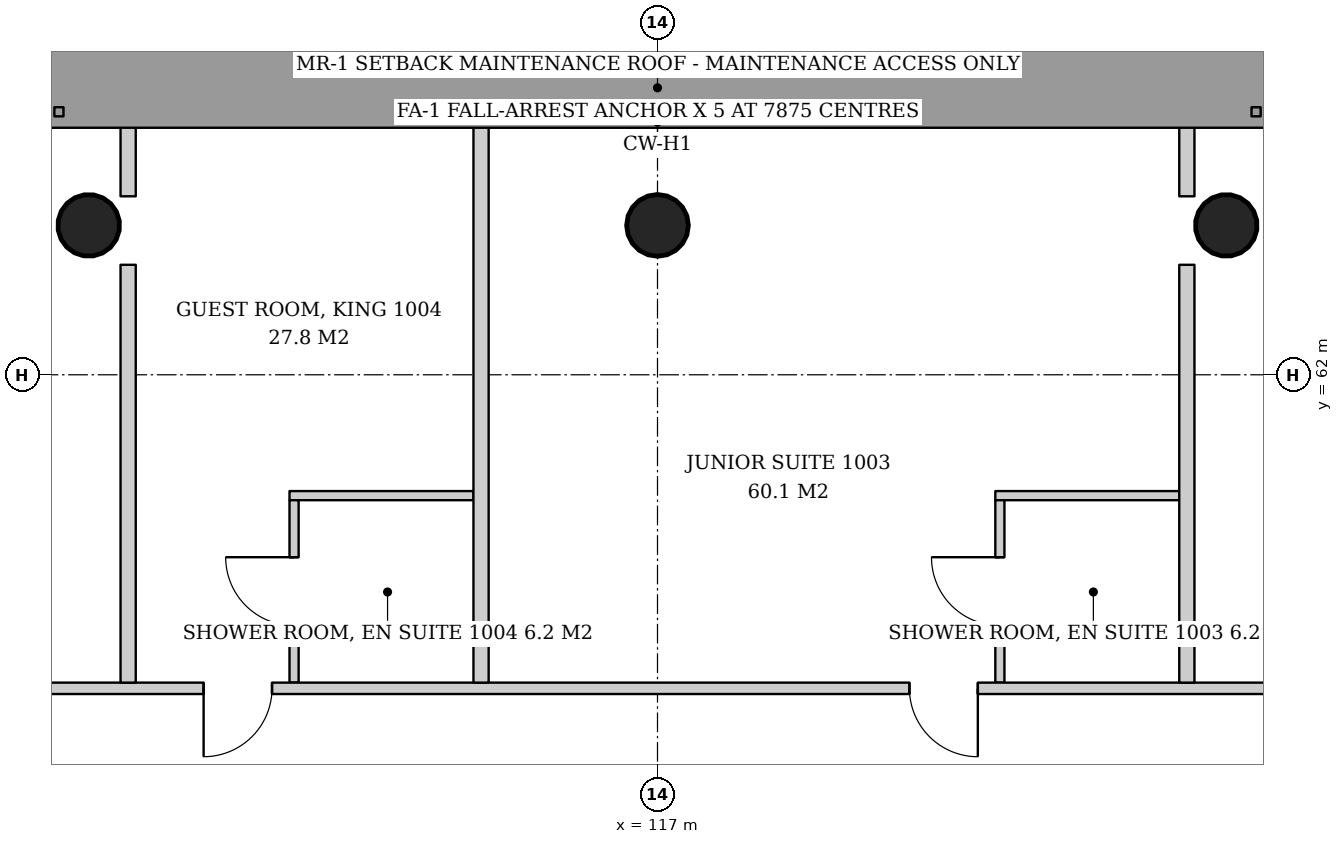
"""IFC4 building model, lengths in metres.
Left out: names, types, materials, properties, quantities, classifications, styles, units other than length and angle.
Written with IfcOpenShell. Run it as: python <this file> out.ifc"""

import sys

from ifc_helpers import new_model, si_unit, direction, frame, frame_2d, origin, origin_2d, place, context, subcontext, project, spatial, rectangle, hollow_circle, extrude, element, fill, save


model = new_model("IFC4")
c1 = context("Model", 3, precision=1e-05, world=origin(), true_north=direction((0.0, 1.0)))
c2 = subcontext(c1, "Body", "Model", "MODEL_VIEW")
j1 = project(units=[si_unit("LENGTHUNIT", "METRE"), si_unit("PLANEANGLEUNIT", "RADIAN")], contexts=[c1])
p1 = place(None, origin())
s1 = spatial("IfcSite", under=j1, at=p1, CompositionType="ELEMENT")
p2 = place(p1, origin())
s2 = spatial("IfcBuilding", under=s1, at=p2, CompositionType="ELEMENT")
p3 = place(p2, frame((0.0, 0.0, 43.8)))
s3 = spatial("IfcBuildingStorey", under=s2, at=p3, CompositionType="ELEMENT", Elevation=43.8)
p4 = place(p3, frame((124.509, 64.017, 0.0), z_axis=(-0.021497706284, -0.043059584825, 0.998841188968), x_axis=(0.894693706707, -0.446680166538, 0.0)))
e1 = element("IfcColumn", 1, at=p4, inside=s3, PredefinedType="COLUMN", context=c2, shape_type="SweptSolid", body=[
    extrude(hollow_circle(Radius=0.406, WallThickness=0.03, at=origin_2d()), origin(), (0.0, 0.0, 1.0), 3.804),
])
p5 = place(p3, frame((117.0, 64.017, 0.0), z_axis=(0.0, -0.043069538298, 0.999072076915), x_axis=(1.0, 0.0, 0.0)))
e2 = element("IfcColumn", 2, at=p5, inside=s3, PredefinedType="COLUMN", context=c2, shape_type="SweptSolid", body=[
    extrude(hollow_circle(Radius=0.406, WallThickness=0.03, at=origin_2d()), origin(), (0.0, 0.0, 1.0), 3.803),
])
p6 = place(p3, frame((109.491, 64.017, 0.0), z_axis=(0.021497706284, -0.043059584825, 0.998841188968), x_axis=(0.894693706707, 0.446680166538, 0.0)))
e3 = element("IfcColumn", 3, at=p6, inside=s3, PredefinedType="COLUMN", context=c2, shape_type="SweptSolid", body=[
    extrude(hollow_circle(Radius=0.406, WallThickness=0.03, at=origin_2d()), origin(), (0.0, 0.0, 1.0), 3.804),
])
p7 = place(p3, frame((123.864, 60.41, 0.0), z_axis=(0.0, 0.0, 1.0), x_axis=(-1.0, 0.0, 0.0)))
e4 = element("IfcWall", 4, at=p7, inside=s3, PredefinedType="PARTITIONING", context=c2, shape_type="SweptSolid", body=[
    extrude(rectangle(XDim=2.42, YDim=0.12, at=frame_2d((1.21, 0.0))), origin(), (0.0, 0.0, 1.0), 2.847),
])
p8 = place(p3, frame((121.504, 57.95, 0.0), z_axis=(0.0, 0.0, 1.0), x_axis=(0.0, 1.0, 0.0)))
e5 = element("IfcWall", 5, at=p8, inside=s3, PredefinedType="PARTITIONING", context=c2, shape_type="SweptSolid", body=[
    extrude(rectangle(XDim=2.4, YDim=0.12, at=frame_2d((1.2, 0.0))), origin(), (0.0, 0.0, 1.0), 2.847),
])
p9 = place(p8, frame((0.75, 0.0, 0.0)))
e6 = element("IfcOpeningElement", 6, at=p9, cuts=e5, PredefinedType="OPENING", context=c2, shape_type="SweptSolid", body=[
    extrude(rectangle(XDim=0.9, YDim=2.1, at=frame_2d((0.45, 1.05))), frame((0.0, 0.07, 0.0), z_axis=(0.0, -1.0, 0.0), x_axis=(1.0, 0.0, 0.0)), (0.0, 0.0, 1.0), 0.14),
])
p10 = place(p3, frame((114.579, 60.41, 0.0), z_axis=(0.0, 0.0, 1.0), x_axis=(-1.0, 0.0, 0.0)))
e7 = element("IfcWall", 7, at=p10, inside=s3, PredefinedType="PARTITIONING", context=c2, shape_type="SweptSolid", body=[
    extrude(rectangle(XDim=2.42, YDim=0.12, at=frame_2d((1.21, 0.0))), origin(), (0.0, 0.0, 1.0), 2.847),
])
p11 = place(p3, frame((112.219, 57.95, 0.0), z_axis=(0.0, 0.0, 1.0), x_axis=(0.0, 1.0, 0.0)))
e8 = element("IfcWall", 8, at=p11, inside=s3, PredefinedType="PARTITIONING", context=c2, shape_type="SweptSolid", body=[
    extrude(rectangle(XDim=2.4, YDim=0.12, at=frame_2d((1.2, 0.0))), origin(), (0.0, 0.0, 1.0), 3.6),
])
p12 = place(p11, frame((0.75, 0.0, 0.0)))
e9 = element("IfcOpeningElement", 9, at=p12, cuts=e8, PredefinedType="OPENING", context=c2, shape_type="SweptSolid", body=[
    extrude(rectangle(XDim=0.9, YDim=2.1, at=frame_2d((0.45, 1.05))), frame((0.0, 0.07, 0.0), z_axis=(0.0, -1.0, 0.0), x_axis=(1.0, 0.0, 0.0)), (0.0, 0.0, 1.0), 0.14),
])
p13 = place(p3, frame((128.95, 57.875, 0.0), z_axis=(0.0, 0.0, 1.0), x_axis=(-1.0, 0.0, 0.0)))
e10 = element("IfcWall", 10, at=p13, inside=s3, PredefinedType="PARTITIONING", context=c2, shape_type="SweptSolid", body=[
    extrude(rectangle(XDim=23.75, YDim=0.15, at=frame_2d((11.875, 0.0))), origin(), (0.0, 0.0, 1.0), 2.8),
])
p14 = place(p13, frame((2.018, 0.0, 0.0)))
e11 = element("IfcOpeningElement", 11, at=p14, cuts=e10, PredefinedType="OPENING", context=c2, shape_type="SweptSolid", body=[
    extrude(rectangle(XDim=1.0, YDim=2.1, at=frame_2d((0.5, 1.05))), frame((0.0, 0.085, 0.0), z_axis=(0.0, -1.0, 0.0), x_axis=(1.0, 0.0, 0.0)), (0.0, 0.0, 1.0), 0.17),
])
p15 = place(p13, frame((7.736, 0.0, 0.0)))
e12 = element("IfcOpeningElement", 12, at=p15, cuts=e10, PredefinedType="OPENING", context=c2, shape_type="SweptSolid", body=[
    extrude(rectangle(XDim=0.9, YDim=2.1, at=frame_2d((0.45, 1.05))), frame((0.0, 0.085, 0.0), z_axis=(0.0, -1.0, 0.0), x_axis=(1.0, 0.0, 0.0)), (0.0, 0.0, 1.0), 0.17),
])
p16 = place(p13, frame((17.021, 0.0, 0.0)))
e13 = element("IfcOpeningElement", 13, at=p16, cuts=e10, PredefinedType="OPENING", context=c2, shape_type="SweptSolid", body=[
    extrude(rectangle(XDim=0.9, YDim=2.1, at=frame_2d((0.45, 1.05))), frame((0.0, 0.085, 0.0), z_axis=(0.0, -1.0, 0.0), x_axis=(1.0, 0.0, 0.0)), (0.0, 0.0, 1.0), 0.17),
])
p17 = place(p3, frame((123.964, 57.95, 0.0), z_axis=(0.0, 0.0, 1.0), x_axis=(0.0, 1.0, 0.0)))
e14 = element("IfcWall", 14, at=p17, inside=s3, PredefinedType="PARTITIONING", context=c2, shape_type="SweptSolid", body=[
    extrude(rectangle(XDim=5.497, YDim=0.2, at=frame_2d((2.749, 0.0))), origin(), (0.0, 0.0, 1.0), 3.6),
])
p18 = place(p3, frame((123.964, 64.348, 0.0), z_axis=(0.0, 0.0, 1.0), x_axis=(0.0, 1.0, 0.0)))
e15 = element("IfcWall", 15, at=p18, inside=s3, PredefinedType="PARTITIONING", context=c2, shape_type="SweptSolid", body=[
    extrude(rectangle(XDim=0.942, YDim=0.2, at=frame_2d((0.471, 0.0))), origin(), (0.0, 0.0, 1.0), 3.6),
])
p19 = place(p3, frame((114.678, 57.95, 0.0), z_axis=(0.0, 0.0, 1.0), x_axis=(0.0, 1.0, 0.0)))
e16 = element("IfcWall", 16, at=p19, inside=s3, PredefinedType="PARTITIONING", context=c2, shape_type="SweptSolid", body=[
    extrude(rectangle(XDim=7.34, YDim=0.2, at=frame_2d((3.67, 0.0))), origin(), (0.0, 0.0, 1.0), 3.05),
])
p20 = place(p3, frame((110.036, 57.95, 0.0), z_axis=(0.0, 0.0, 1.0), x_axis=(0.0, 1.0, 0.0)))
e17 = element("IfcWall", 17, at=p20, inside=s3, PredefinedType="PARTITIONING", context=c2, shape_type="SweptSolid", body=[
    extrude(rectangle(XDim=5.497, YDim=0.2, at=frame_2d((2.749, 0.0))), origin(), (0.0, 0.0, 1.0), 3.6),
])
p21 = place(p3, frame((110.036, 64.348, 0.0), z_axis=(0.0, 0.0, 1.0), x_axis=(0.0, 1.0, 0.0)))
e18 = element("IfcWall", 18, at=p21, inside=s3, PredefinedType="PARTITIONING", context=c2, shape_type="SweptSolid", body=[
    extrude(rectangle(XDim=0.942, YDim=0.2, at=frame_2d((0.471, 0.0))), origin(), (0.0, 0.0, 1.0), 3.6),
])
p22 = place(p9, origin())
e19 = element("IfcDoor", 19, at=p22, inside=s3, OperationType="SINGLE_SWING_RIGHT", PredefinedType="DOOR", context=c2, shape_type="SweptSolid", body=[
    extrude(rectangle(XDim=0.9, YDim=2.1, at=frame_2d((0.45, 1.05))), frame((0.0, 0.025, 0.0), z_axis=(0.0, -1.0, 0.0), x_axis=(1.0, 0.0, 0.0)), (0.0, 0.0, 1.0), 0.05),
])
fill(e6, e19)
p23 = place(p12, origin())
e20 = element("IfcDoor", 20, at=p23, inside=s3, OperationType="SINGLE_SWING_RIGHT", PredefinedType="DOOR", context=c2, shape_type="SweptSolid", body=[
    extrude(rectangle(XDim=0.9, YDim=2.1, at=frame_2d((0.45, 1.05))), frame((0.0, 0.025, 0.0), z_axis=(0.0, -1.0, 0.0), x_axis=(1.0, 0.0, 0.0)), (0.0, 0.0, 1.0), 0.05),
])
fill(e9, e20)
p24 = place(p15, origin())
e21 = element("IfcDoor", 21, at=p24, inside=s3, OperationType="SINGLE_SWING_LEFT", PredefinedType="DOOR", context=c2, shape_type="SweptSolid", body=[
    extrude(rectangle(XDim=0.9, YDim=2.1, at=frame_2d((0.45, 1.05))), frame((0.0, 0.025, 0.0), z_axis=(0.0, -1.0, 0.0), x_axis=(1.0, 0.0, 0.0)), (0.0, 0.0, 1.0), 0.05),
])
fill(e12, e21)
p25 = place(p16, origin())
e22 = element("IfcDoor", 22, at=p25, inside=s3, OperationType="SINGLE_SWING_RIGHT", PredefinedType="DOOR", context=c2, shape_type="SweptSolid", body=[
    extrude(rectangle(XDim=0.9, YDim=2.1, at=frame_2d((0.45, 1.05))), frame((0.0, 0.025, 0.0), z_axis=(0.0, -1.0, 0.0), x_axis=(1.0, 0.0, 0.0)), (0.0, 0.0, 1.0), 0.05),
])
fill(e13, e22)
save(model, sys.argv[1])
